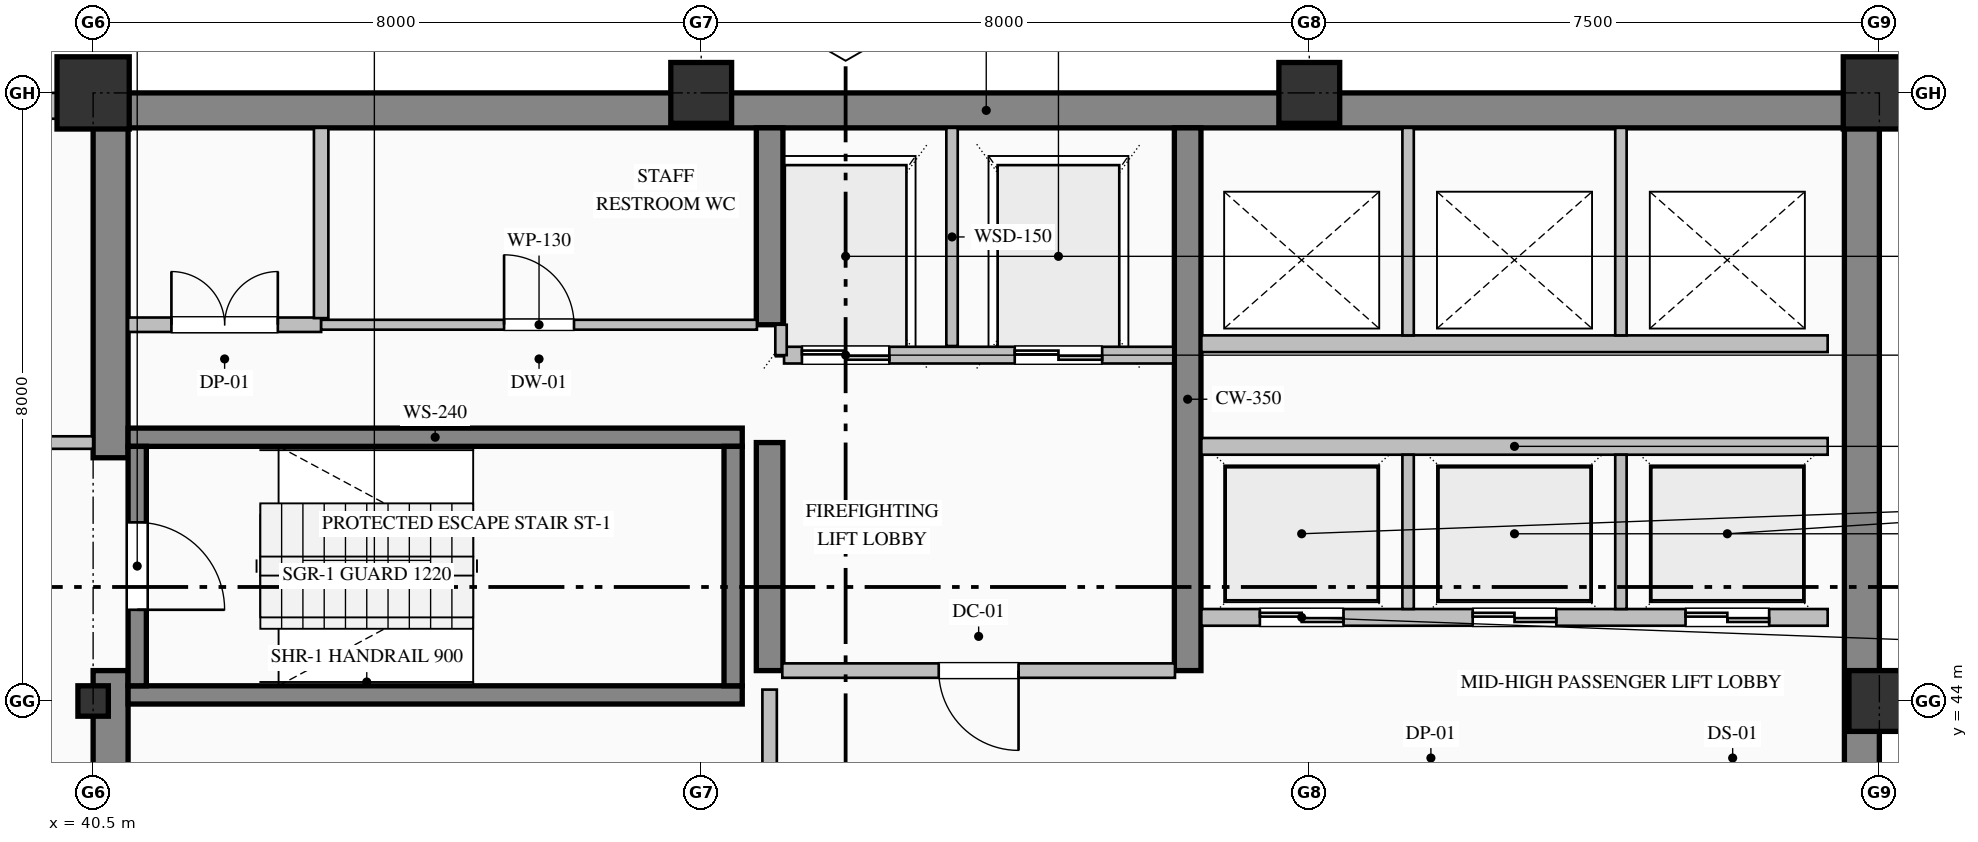
"""IFC4 building model, lengths in metres.
Left out: names, types, materials, properties, quantities, classifications, styles, units other than length and angle.
Written with IfcOpenShell. Run it as: python <this file> out.ifc"""

import sys

from ifc_helpers import new_model, si_unit, direction, frame, frame_2d, origin, origin_2d, place, context, subcontext, project, spatial, rectangle, hollow_rectangle, i_section, extrude, element, fill, save


model = new_model("IFC4")
c1 = context("Model", 3, precision=1e-05, world=origin(), true_north=direction((0.0, 1.0)))
c2 = subcontext(c1, "Body", "Model", "MODEL_VIEW")
j1 = project(units=[si_unit("LENGTHUNIT", "METRE"), si_unit("PLANEANGLEUNIT", "RADIAN")], contexts=[c1])
p1 = place(None, origin())
s1 = spatial("IfcSite", under=j1, at=p1, CompositionType="ELEMENT")
p2 = place(p1, origin())
s2 = spatial("IfcBuilding", under=s1, at=p2, CompositionType="ELEMENT")
p3 = place(p2, frame((0.0, 0.0, 213.8)))
s3 = spatial("IfcBuildingStorey", under=s2, at=p3, CompositionType="ELEMENT", Elevation=213.8)
p4 = place(p3, frame((40.5, 51.77, 0.0), z_axis=(0.0, 0.0, 1.0), x_axis=(1.0, 0.0, 0.0)))
e1 = element("IfcWall", 1, at=p4, inside=s3, PredefinedType="SHEAR", context=c2, shape_type="SweptSolid", body=[
    extrude(rectangle(XDim=23.5, YDim=0.46, at=frame_2d((11.75, 0.0))), origin(), (0.0, 0.0, 1.0), 3.775),
])
p5 = place(p3, frame((63.77, 36.32, 0.0), z_axis=(0.0, 0.0, 1.0), x_axis=(0.0, 1.0, 0.0)))
e2 = element("IfcWall", 2, at=p5, inside=s3, PredefinedType="SHEAR", context=c2, shape_type="SweptSolid", body=[
    extrude(rectangle(XDim=15.22, YDim=0.46, at=frame_2d((7.61, 0.0))), origin(), (0.0, 0.0, 1.0), 3.775),
])
p6 = place(p3, frame((40.73, 36.46, 0.0), z_axis=(0.0, 0.0, 1.0), x_axis=(0.0, 1.0, 0.0)))
e3 = element("IfcWall", 3, at=p6, inside=s3, PredefinedType="SHEAR", context=c2, shape_type="SweptSolid", body=[
    extrude(rectangle(XDim=7.94, YDim=0.46, at=frame_2d((3.97, 0.0))), origin(), (0.0, 0.0, 1.0), 3.775),
])
p7 = place(p3, frame((40.73, 47.2, 0.0), z_axis=(0.0, 0.0, 1.0), x_axis=(0.0, 1.0, 0.0)))
e4 = element("IfcWall", 4, at=p7, inside=s3, PredefinedType="SHEAR", context=c2, shape_type="SweptSolid", body=[
    extrude(rectangle(XDim=4.34, YDim=0.46, at=frame_2d((2.17, 0.0))), origin(), (0.0, 0.0, 1.0), 3.775),
])
p8 = place(p3, frame((49.4, 44.4, 0.0), z_axis=(0.0, 0.0, 1.0), x_axis=(0.0, 1.0, 0.0)))
e5 = element("IfcWall", 5, at=p8, inside=s3, PredefinedType="SHEAR", context=c2, shape_type="SweptSolid", body=[
    extrude(rectangle(XDim=3.0, YDim=0.35, at=frame_2d((1.5, 0.0))), origin(), (0.0, 0.0, 1.0), 3.775),
])
p9 = place(p3, frame((49.4, 48.95, 0.0), z_axis=(0.0, 0.0, 1.0), x_axis=(0.0, 1.0, 0.0)))
e6 = element("IfcWall", 6, at=p9, inside=s3, PredefinedType="SHEAR", context=c2, shape_type="SweptSolid", body=[
    extrude(rectangle(XDim=2.59, YDim=0.35, at=frame_2d((1.295, 0.0))), origin(), (0.0, 0.0, 1.0), 3.775),
])
p10 = place(p3, frame((54.9, 44.4, 0.0), z_axis=(0.0, 0.0, 1.0), x_axis=(0.0, 1.0, 0.0)))
e7 = element("IfcWall", 7, at=p10, inside=s3, PredefinedType="SHEAR", context=c2, shape_type="SweptSolid", body=[
    extrude(rectangle(XDim=7.14, YDim=0.35, at=frame_2d((3.57, 0.0))), origin(), (0.0, 0.0, 1.0), 3.775),
])
p11 = place(p3, frame((40.5, 44.0, 0.0), z_axis=(0.0, 0.0, 1.0), x_axis=(1.0, 0.0, 0.0)))
e8 = element("IfcColumn", 8, at=p11, inside=s3, PredefinedType="COLUMN", context=c2, shape_type="SweptSolid", body=[
    extrude(i_section(OverallWidth=0.4, OverallDepth=0.4, WebThickness=0.013, FlangeThickness=0.021, FilletRadius=0.022, at=origin_2d()), origin(), (0.0, 0.0, 1.0), 4.0),
])
p12 = place(p3, frame((40.5, 52.0, 0.0), z_axis=(0.0, 0.0, 1.0), x_axis=(1.0, 0.0, 0.0)))
e9 = element("IfcColumn", 9, at=p12, inside=s3, PredefinedType="COLUMN", context=c2, shape_type="SweptSolid", body=[
    extrude(hollow_rectangle(XDim=0.95, YDim=0.95, WallThickness=0.036, at=origin_2d()), origin(), (0.0, 0.0, 1.0), 4.0),
])
for number, where, z_axis, x_axis in (
    (10, (48.5, 52.0, 0.0), (0.0, 0.0, 1.0), (1.0, 0.0, 0.0)),
    (11, (56.5, 52.0, 0.0), (0.0, 0.0, 1.0), (1.0, 0.0, 0.0)),
    (12, (64.0, 44.0, 0.0), (0.0, 0.0, 1.0), (1.0, 0.0, 0.0)),
):
    element("IfcColumn", number, at=place(p3, frame(where, z_axis=z_axis, x_axis=x_axis)), inside=s3, PredefinedType="COLUMN", context=c2, shape_type="SweptSolid", body=[
        extrude(hollow_rectangle(XDim=0.8, YDim=0.8, WallThickness=0.032, at=origin_2d()), origin(), (0.0, 0.0, 1.0), 4.0),
    ])
p13 = place(p3, frame((64.0, 52.0, 0.0), z_axis=(0.0, 0.0, 1.0), x_axis=(1.0, 0.0, 0.0)))
e13 = element("IfcColumn", 13, at=p13, inside=s3, PredefinedType="COLUMN", context=c2, shape_type="SweptSolid", body=[
    extrude(hollow_rectangle(XDim=0.95, YDim=0.95, WallThickness=0.036, at=origin_2d()), origin(), (0.0, 0.0, 1.0), 4.0),
])
p14 = place(p3, frame((13.0, 51.83, 0.0), z_axis=(0.0, 0.0, 1.0), x_axis=(1.0, 0.0, 0.0)))
e14 = element("IfcWall", 14, at=p14, inside=s3, PredefinedType="SOLIDWALL", context=c2, shape_type="SweptSolid", body=[
    extrude(rectangle(XDim=27.52, YDim=0.34, at=frame_2d((13.76, 0.0))), origin(), (0.0, 0.0, 1.0), 3.325),
])
p15 = place(p14, frame((17.4, 0.0, 0.9)))
e15 = element("IfcOpeningElement", 15, at=p15, cuts=e14, PredefinedType="OPENING", context=c2, shape_type="SweptSolid", body=[
    extrude(rectangle(XDim=1.2, YDim=1.85, at=frame_2d((0.6, 0.925))), frame((0.0, 0.18, 0.0), z_axis=(0.0, -1.0, 0.0), x_axis=(1.0, 0.0, 0.0)), (0.0, 0.0, 1.0), 0.36),
])
for number, where, z_axis, x_axis in (
    (16, (40.96, 47.47, 0.0), (0.0, 0.0, 1.0), (1.0, 0.0, 0.0)),
    (17, (49.04, 44.08, 0.0), (0.0, 0.0, 1.0), (-1.0, 0.0, 0.0)),
):
    element("IfcWall", number, at=place(p3, frame(where, z_axis=z_axis, x_axis=x_axis)), inside=s3, PredefinedType="SOLIDWALL", context=c2, shape_type="SweptSolid", body=[
        extrude(rectangle(XDim=8.08, YDim=0.24, at=frame_2d((4.04, 0.0))), origin(), (0.0, 0.0, 1.0), 4.0),
    ])
p16 = place(p3, frame((41.08, 47.35, 0.0), z_axis=(0.0, 0.0, 1.0), x_axis=(0.0, -1.0, 0.0)))
e18 = element("IfcWall", 18, at=p16, inside=s3, PredefinedType="SOLIDWALL", context=c2, shape_type="SweptSolid", body=[
    extrude(rectangle(XDim=3.15, YDim=0.24, at=frame_2d((1.575, 0.0))), origin(), (0.0, 0.0, 1.0), 4.0),
])
p17 = place(p16, frame((1.0, 0.0, 0.0)))
e19 = element("IfcOpeningElement", 19, at=p17, cuts=e18, PredefinedType="OPENING", context=c2, shape_type="SweptSolid", body=[
    extrude(rectangle(XDim=1.15, YDim=2.2, at=frame_2d((0.575, 1.1))), frame((0.0, 0.13, 0.0), z_axis=(0.0, -1.0, 0.0), x_axis=(1.0, 0.0, 0.0)), (0.0, 0.0, 1.0), 0.26),
])
p18 = place(p3, frame((48.92, 44.2, 0.0), z_axis=(0.0, 0.0, 1.0), x_axis=(0.0, 1.0, 0.0)))
e20 = element("IfcWall", 20, at=p18, inside=s3, PredefinedType="SOLIDWALL", context=c2, shape_type="SweptSolid", body=[
    extrude(rectangle(XDim=3.15, YDim=0.24, at=frame_2d((1.575, 0.0))), origin(), (0.0, 0.0, 1.0), 4.0),
])
p19 = place(p3, frame((54.71, 48.55, 0.0), z_axis=(0.0, 0.0, 1.0), x_axis=(-1.0, 0.0, 0.0)))
e21 = element("IfcWall", 21, at=p19, inside=s3, PredefinedType="PARTITIONING", context=c2, shape_type="SweptSolid", body=[
    extrude(rectangle(XDim=5.12, YDim=0.22, at=frame_2d((2.56, 0.0))), origin(), (0.0, 0.0, 1.0), 3.775),
])
p20 = place(p19, frame((3.735, 0.0, 0.0)))
e22 = element("IfcOpeningElement", 22, at=p20, cuts=e21, PredefinedType="OPENING", context=c2, shape_type="SweptSolid", body=[
    extrude(rectangle(XDim=1.15, YDim=2.2, at=frame_2d((0.575, 1.1))), frame((0.0, 0.12, 0.0), z_axis=(0.0, -1.0, 0.0), x_axis=(1.0, 0.0, 0.0)), (0.0, 0.0, 1.0), 0.24),
])
p21 = place(p19, frame((0.935, 0.0, 0.0)))
e23 = element("IfcOpeningElement", 23, at=p21, cuts=e21, PredefinedType="OPENING", context=c2, shape_type="SweptSolid", body=[
    extrude(rectangle(XDim=1.15, YDim=2.2, at=frame_2d((0.575, 1.1))), frame((0.0, 0.12, 0.0), z_axis=(0.0, -1.0, 0.0), x_axis=(1.0, 0.0, 0.0)), (0.0, 0.0, 1.0), 0.24),
])
p22 = place(p3, frame((51.8, 48.67, 0.0), z_axis=(0.0, 0.0, 1.0), x_axis=(0.0, 1.0, 0.0)))
e24 = element("IfcWall", 24, at=p22, inside=s3, PredefinedType="PARTITIONING", context=c2, shape_type="SweptSolid", body=[
    extrude(rectangle(XDim=2.87, YDim=0.15, at=frame_2d((1.435, 0.0))), origin(), (0.0, 0.0, 1.0), 3.775),
])
p23 = place(p3, frame((49.55, 48.55, 0.0), z_axis=(0.0, 0.0, 1.0), x_axis=(0.0, 1.0, 0.0)))
e25 = element("IfcWall", 25, at=p23, inside=s3, PredefinedType="PARTITIONING", context=c2, shape_type="SweptSolid", body=[
    extrude(rectangle(XDim=0.4, YDim=0.15, at=frame_2d((0.2, 0.0))), origin(), (0.0, 0.0, 1.0), 3.775),
])
p24 = place(p3, frame((63.32, 45.1, 0.0), z_axis=(0.0, 0.0, 1.0), x_axis=(-1.0, 0.0, 0.0)))
e26 = element("IfcWall", 26, at=p24, inside=s3, PredefinedType="PARTITIONING", context=c2, shape_type="SweptSolid", body=[
    extrude(rectangle(XDim=8.24, YDim=0.22, at=frame_2d((4.12, 0.0))), origin(), (0.0, 0.0, 1.0), 3.775),
])
p25 = place(p24, frame((6.37, 0.0, 0.0)))
e27 = element("IfcOpeningElement", 27, at=p25, cuts=e26, PredefinedType="OPENING", context=c2, shape_type="SweptSolid", body=[
    extrude(rectangle(XDim=1.1, YDim=2.2, at=frame_2d((0.55, 1.1))), frame((0.0, 0.12, 0.0), z_axis=(0.0, -1.0, 0.0), x_axis=(1.0, 0.0, 0.0)), (0.0, 0.0, 1.0), 0.24),
])
p26 = place(p24, frame((3.57, 0.0, 0.0)))
e28 = element("IfcOpeningElement", 28, at=p26, cuts=e26, PredefinedType="OPENING", context=c2, shape_type="SweptSolid", body=[
    extrude(rectangle(XDim=1.1, YDim=2.2, at=frame_2d((0.55, 1.1))), frame((0.0, 0.12, 0.0), z_axis=(0.0, -1.0, 0.0), x_axis=(1.0, 0.0, 0.0)), (0.0, 0.0, 1.0), 0.24),
])
p27 = place(p24, frame((0.77, 0.0, 0.0)))
e29 = element("IfcOpeningElement", 29, at=p27, cuts=e26, PredefinedType="OPENING", context=c2, shape_type="SweptSolid", body=[
    extrude(rectangle(XDim=1.1, YDim=2.2, at=frame_2d((0.55, 1.1))), frame((0.0, 0.12, 0.0), z_axis=(0.0, -1.0, 0.0), x_axis=(1.0, 0.0, 0.0)), (0.0, 0.0, 1.0), 0.24),
])
p28 = place(p3, frame((55.08, 47.35, 0.0), z_axis=(0.0, 0.0, 1.0), x_axis=(1.0, 0.0, 0.0)))
e30 = element("IfcWall", 30, at=p28, inside=s3, PredefinedType="PARTITIONING", context=c2, shape_type="SweptSolid", body=[
    extrude(rectangle(XDim=8.24, YDim=0.22, at=frame_2d((4.12, 0.0))), origin(), (0.0, 0.0, 1.0), 3.775),
])
for number, where, z_axis, x_axis in (
    (31, (57.8, 45.21, 0.0), (0.0, 0.0, 1.0), (0.0, 1.0, 0.0)),
    (32, (60.6, 45.21, 0.0), (0.0, 0.0, 1.0), (0.0, 1.0, 0.0)),
):
    element("IfcWall", number, at=place(p3, frame(where, z_axis=z_axis, x_axis=x_axis)), inside=s3, PredefinedType="PARTITIONING", context=c2, shape_type="SweptSolid", body=[
        extrude(rectangle(XDim=2.03, YDim=0.15, at=frame_2d((1.015, 0.0))), origin(), (0.0, 0.0, 1.0), 3.775),
    ])
p29 = place(p3, frame((63.32, 48.7, 0.0), z_axis=(0.0, 0.0, 1.0), x_axis=(-1.0, 0.0, 0.0)))
e33 = element("IfcWall", 33, at=p29, inside=s3, PredefinedType="PARTITIONING", context=c2, shape_type="SweptSolid", body=[
    extrude(rectangle(XDim=8.24, YDim=0.22, at=frame_2d((4.12, 0.0))), origin(), (0.0, 0.0, 1.0), 3.775),
])
for number, where, z_axis, x_axis in (
    (34, (57.8, 48.81, 0.0), (0.0, 0.0, 1.0), (0.0, 1.0, 0.0)),
    (35, (60.6, 48.81, 0.0), (0.0, 0.0, 1.0), (0.0, 1.0, 0.0)),
):
    element("IfcWall", number, at=place(p3, frame(where, z_axis=z_axis, x_axis=x_axis)), inside=s3, PredefinedType="PARTITIONING", context=c2, shape_type="SweptSolid", body=[
        extrude(rectangle(XDim=2.73, YDim=0.15, at=frame_2d((1.365, 0.0))), origin(), (0.0, 0.0, 1.0), 3.775),
    ])
p30 = place(p3, frame((37.8, 47.4, 0.0), z_axis=(0.0, 0.0, 1.0), x_axis=(1.0, 0.0, 0.0)))
e36 = element("IfcWall", 36, at=p30, inside=s3, PredefinedType="PARTITIONING", context=c2, shape_type="SweptSolid", body=[
    extrude(rectangle(XDim=2.7, YDim=0.165, at=frame_2d((1.35, 0.0))), origin(), (0.0, 0.0, 1.0), 3.775),
])
p31 = place(p30, frame((0.825, 0.0, 0.0)))
e37 = element("IfcOpeningElement", 37, at=p31, cuts=e36, PredefinedType="OPENING", context=c2, shape_type="SweptSolid", body=[
    extrude(rectangle(XDim=1.05, YDim=2.15, at=frame_2d((0.525, 1.075))), frame((0.0, 0.093, 0.0), z_axis=(0.0, -1.0, 0.0), x_axis=(1.0, 0.0, 0.0)), (0.0, 0.0, 1.0), 0.185),
])
p32 = place(p3, frame((40.96, 48.95, 0.0), z_axis=(0.0, 0.0, 1.0), x_axis=(1.0, 0.0, 0.0)))
e38 = element("IfcWall", 38, at=p32, inside=s3, PredefinedType="PARTITIONING", context=c2, shape_type="SweptSolid", body=[
    extrude(rectangle(XDim=2.54, YDim=0.19, at=frame_2d((1.27, 0.0))), origin(), (0.0, 0.0, 1.0), 3.775),
])
p33 = place(p32, frame((0.57, 0.0, 0.0)))
e39 = element("IfcOpeningElement", 39, at=p33, cuts=e38, PredefinedType="OPENING", context=c2, shape_type="SweptSolid", body=[
    extrude(rectangle(XDim=1.4, YDim=2.25, at=frame_2d((0.7, 1.125))), frame((0.0, 0.105, 0.0), z_axis=(0.0, -1.0, 0.0), x_axis=(1.0, 0.0, 0.0)), (0.0, 0.0, 1.0), 0.21),
])
p34 = place(p3, frame((43.5, 48.95, 0.0), z_axis=(0.0, 0.0, 1.0), x_axis=(1.0, 0.0, 0.0)))
e40 = element("IfcWall", 40, at=p34, inside=s3, PredefinedType="PARTITIONING", context=c2, shape_type="SweptSolid", body=[
    extrude(rectangle(XDim=5.733, YDim=0.13, at=frame_2d((2.866, 0.0))), origin(), (0.0, 0.0, 1.0), 3.775),
])
p35 = place(p34, frame((2.406, 0.0, 0.0)))
e41 = element("IfcOpeningElement", 41, at=p35, cuts=e40, PredefinedType="OPENING", context=c2, shape_type="SweptSolid", body=[
    extrude(rectangle(XDim=0.92, YDim=2.15, at=frame_2d((0.46, 1.075))), frame((0.0, 0.075, 0.0), z_axis=(0.0, -1.0, 0.0), x_axis=(1.0, 0.0, 0.0)), (0.0, 0.0, 1.0), 0.15),
])
p36 = place(p3, frame((54.733, 44.4, 0.0), z_axis=(0.0, 0.0, 1.0), x_axis=(-1.0, 0.0, 0.0)))
e42 = element("IfcWall", 42, at=p36, inside=s3, PredefinedType="PARTITIONING", context=c2, shape_type="SweptSolid", body=[
    extrude(rectangle(XDim=5.166, YDim=0.19, at=frame_2d((2.583, 0.0))), origin(), (0.0, 0.0, 1.0), 3.775),
])
p37 = place(p36, frame((2.058, 0.0, 0.0)))
e43 = element("IfcOpeningElement", 43, at=p37, cuts=e42, PredefinedType="OPENING", context=c2, shape_type="SweptSolid", body=[
    extrude(rectangle(XDim=1.05, YDim=2.15, at=frame_2d((0.525, 1.075))), frame((0.0, 0.105, 0.0), z_axis=(0.0, -1.0, 0.0), x_axis=(1.0, 0.0, 0.0)), (0.0, 0.0, 1.0), 0.21),
])
p38 = place(p3, frame((49.4, 40.487, 0.0), z_axis=(0.0, 0.0, 1.0), x_axis=(0.0, 1.0, 0.0)))
e44 = element("IfcWall", 44, at=p38, inside=s3, PredefinedType="PARTITIONING", context=c2, shape_type="SweptSolid", body=[
    extrude(rectangle(XDim=3.663, YDim=0.19, at=frame_2d((1.832, 0.0))), origin(), (0.0, 0.0, 1.0), 3.017),
])
p39 = place(p38, frame((1.132, 0.0, 0.0)))
e45 = element("IfcOpeningElement", 45, at=p39, cuts=e44, PredefinedType="OPENING", context=c2, shape_type="SweptSolid", body=[
    extrude(rectangle(XDim=1.4, YDim=2.25, at=frame_2d((0.7, 1.125))), frame((0.0, 0.105, 0.0), z_axis=(0.0, -1.0, 0.0), x_axis=(1.0, 0.0, 0.0)), (0.0, 0.0, 1.0), 0.21),
])
p40 = place(p3, frame((43.5, 51.54, 0.0), z_axis=(0.0, 0.0, 1.0), x_axis=(0.0, -1.0, 0.0)))
e46 = element("IfcWall", 46, at=p40, inside=s3, PredefinedType="PARTITIONING", context=c2, shape_type="SweptSolid", body=[
    extrude(rectangle(XDim=2.503, YDim=0.19, at=frame_2d((1.251, 0.0))), origin(), (0.0, 0.0, 1.0), 3.775),
])
p41 = place(p17, origin())
e47 = element("IfcDoor", 47, at=p41, inside=s3, OperationType="SINGLE_SWING_RIGHT", PredefinedType="DOOR", context=c2, shape_type="SweptSolid", body=[
    extrude(rectangle(XDim=1.15, YDim=2.2, at=frame_2d((0.575, 1.1))), frame((0.0, 0.025, 0.0), z_axis=(0.0, -1.0, 0.0), x_axis=(1.0, 0.0, 0.0)), (0.0, 0.0, 1.0), 0.05),
])
fill(e19, e47)
p42 = place(p20, origin())
e48 = element("IfcDoor", 48, at=p42, inside=s3, OperationType="DOUBLE_DOOR_SLIDING", PredefinedType="DOOR", context=c2, shape_type="SweptSolid", body=[
    extrude(rectangle(XDim=1.15, YDim=2.2, at=frame_2d((0.575, 1.1))), frame((0.0, 0.025, 0.0), z_axis=(0.0, -1.0, 0.0), x_axis=(1.0, 0.0, 0.0)), (0.0, 0.0, 1.0), 0.05),
])
fill(e22, e48)
p43 = place(p21, origin())
e49 = element("IfcDoor", 49, at=p43, inside=s3, OperationType="DOUBLE_DOOR_SLIDING", PredefinedType="DOOR", context=c2, shape_type="SweptSolid", body=[
    extrude(rectangle(XDim=1.15, YDim=2.2, at=frame_2d((0.575, 1.1))), frame((0.0, 0.025, 0.0), z_axis=(0.0, -1.0, 0.0), x_axis=(1.0, 0.0, 0.0)), (0.0, 0.0, 1.0), 0.05),
])
fill(e23, e49)
p44 = place(p25, origin())
e50 = element("IfcDoor", 50, at=p44, inside=s3, OperationType="DOUBLE_DOOR_SLIDING", PredefinedType="DOOR", context=c2, shape_type="SweptSolid", body=[
    extrude(rectangle(XDim=1.1, YDim=2.2, at=frame_2d((0.55, 1.1))), frame((0.0, 0.025, 0.0), z_axis=(0.0, -1.0, 0.0), x_axis=(1.0, 0.0, 0.0)), (0.0, 0.0, 1.0), 0.05),
])
fill(e27, e50)
p45 = place(p26, origin())
e51 = element("IfcDoor", 51, at=p45, inside=s3, OperationType="DOUBLE_DOOR_SLIDING", PredefinedType="DOOR", context=c2, shape_type="SweptSolid", body=[
    extrude(rectangle(XDim=1.1, YDim=2.2, at=frame_2d((0.55, 1.1))), frame((0.0, 0.025, 0.0), z_axis=(0.0, -1.0, 0.0), x_axis=(1.0, 0.0, 0.0)), (0.0, 0.0, 1.0), 0.05),
])
fill(e28, e51)
p46 = place(p27, origin())
e52 = element("IfcDoor", 52, at=p46, inside=s3, OperationType="DOUBLE_DOOR_SLIDING", PredefinedType="DOOR", context=c2, shape_type="SweptSolid", body=[
    extrude(rectangle(XDim=1.1, YDim=2.2, at=frame_2d((0.55, 1.1))), frame((0.0, 0.025, 0.0), z_axis=(0.0, -1.0, 0.0), x_axis=(1.0, 0.0, 0.0)), (0.0, 0.0, 1.0), 0.05),
])
fill(e29, e52)
p47 = place(p37, origin())
e53 = element("IfcDoor", 53, at=p47, inside=s3, OperationType="SINGLE_SWING_LEFT", PredefinedType="DOOR", context=c2, shape_type="SweptSolid", body=[
    extrude(rectangle(XDim=1.05, YDim=2.15, at=frame_2d((0.525, 1.075))), frame((0.0, 0.025, 0.0), z_axis=(0.0, -1.0, 0.0), x_axis=(1.0, 0.0, 0.0)), (0.0, 0.0, 1.0), 0.05),
])
fill(e43, e53)
p48 = place(p33, origin())
e54 = element("IfcDoor", 54, at=p48, inside=s3, OperationType="DOUBLE_DOOR_SINGLE_SWING", PredefinedType="DOOR", context=c2, shape_type="SweptSolid", body=[
    extrude(rectangle(XDim=1.4, YDim=2.25, at=frame_2d((0.7, 1.125))), frame((0.0, 0.025, 0.0), z_axis=(0.0, -1.0, 0.0), x_axis=(1.0, 0.0, 0.0)), (0.0, 0.0, 1.0), 0.05),
])
fill(e39, e54)
p49 = place(p35, origin())
e55 = element("IfcDoor", 55, at=p49, inside=s3, OperationType="SINGLE_SWING_LEFT", PredefinedType="DOOR", context=c2, shape_type="SweptSolid", body=[
    extrude(rectangle(XDim=0.92, YDim=2.15, at=frame_2d((0.46, 1.075))), frame((0.0, 0.025, 0.0), z_axis=(0.0, -1.0, 0.0), x_axis=(1.0, 0.0, 0.0)), (0.0, 0.0, 1.0), 0.05),
])
fill(e41, e55)
save(model, sys.argv[1])
